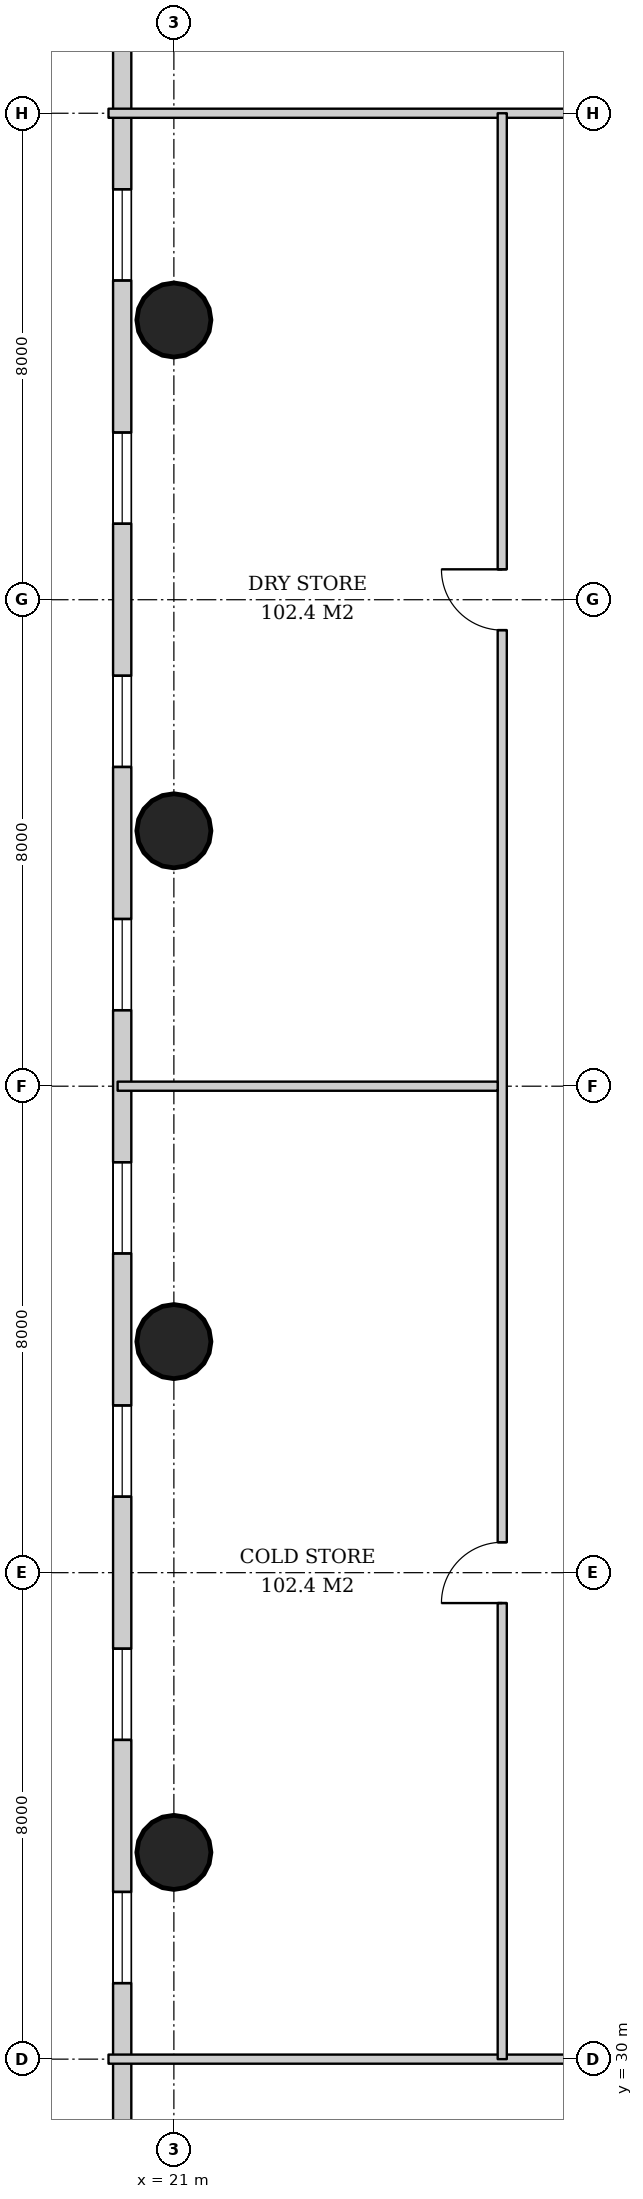
"""IFC4 building model, lengths in metres.
Left out: names, types, materials, properties, quantities, classifications, styles, units other than length and angle.
Written with IfcOpenShell. Run it as: python <this file> out.ifc"""

import sys

from ifc_helpers import new_model, si_unit, direction, frame, frame_2d, origin, origin_2d, place, context, subcontext, project, spatial, rectangle, hollow_circle, extrude, element, fill, save


model = new_model("IFC4")
c1 = context("Model", 3, precision=1e-05, world=origin(), true_north=direction((0.0, 1.0)))
c2 = subcontext(c1, "Body", "Model", "MODEL_VIEW")
j1 = project(units=[si_unit("LENGTHUNIT", "METRE"), si_unit("PLANEANGLEUNIT", "RADIAN")], contexts=[c1])
p1 = place(None, origin())
s1 = spatial("IfcSite", under=j1, at=p1, CompositionType="ELEMENT")
p2 = place(p1, origin())
s2 = spatial("IfcBuilding", under=s1, at=p2, CompositionType="ELEMENT")
p3 = place(p2, frame((0.0, 0.0, 16.0)))
s3 = spatial("IfcBuildingStorey", under=s2, at=p3, CompositionType="ELEMENT", Elevation=16.0)
for number, where, z_axis, x_axis in (
    (1, (21.0, 58.6, 0.0), (0.0, 0.0, 1.0), (1.0, 0.0, 0.0)),
    (2, (21.0, 50.2, 0.0), (0.0, 0.0, 1.0), (1.0, 0.0, 0.0)),
    (3, (21.0, 41.8, 0.0), (0.0, 0.0, 1.0), (1.0, 0.0, 0.0)),
    (4, (21.0, 33.4, 0.0), (0.0, 0.0, 1.0), (1.0, 0.0, 0.0)),
):
    element("IfcColumn", number, at=place(p3, frame(where, z_axis=z_axis, x_axis=x_axis)), inside=s3, PredefinedType="COLUMN", context=c2, shape_type="SweptSolid", body=[
        extrude(hollow_circle(Radius=0.61, WallThickness=0.04, at=origin_2d()), origin(), (0.0, 0.0, 1.0), 5.0),
    ])
p4 = place(p3, frame((20.15, 70.7, 0.0), z_axis=(0.0, 0.0, 1.0), x_axis=(0.0, -1.0, 0.0)))
e5 = element("IfcWall", 5, at=p4, inside=s3, PredefinedType="SOLIDWALL", context=c2, shape_type="SweptSolid", body=[
    extrude(rectangle(XDim=49.4, YDim=0.3, at=frame_2d((24.7, 0.0))), origin(), (0.0, 0.0, 1.0), 4.7),
])
p5 = place(p4, frame((1.2, 0.0, 0.9)))
e6 = element("IfcOpeningElement", 6, at=p5, cuts=e5, PredefinedType="OPENING", context=c2, shape_type="SweptSolid", body=[
    extrude(rectangle(XDim=1.5, YDim=3.2, at=frame_2d((0.75, 1.6))), frame((0.0, 0.16, 0.0), z_axis=(0.0, -1.0, 0.0), x_axis=(1.0, 0.0, 0.0)), (0.0, 0.0, 1.0), 0.32),
])
p6 = place(p4, frame((5.7, 0.0, 0.9)))
e7 = element("IfcOpeningElement", 7, at=p6, cuts=e5, PredefinedType="OPENING", context=c2, shape_type="SweptSolid", body=[
    extrude(rectangle(XDim=1.5, YDim=3.2, at=frame_2d((0.75, 1.6))), frame((0.0, 0.16, 0.0), z_axis=(0.0, -1.0, 0.0), x_axis=(1.0, 0.0, 0.0)), (0.0, 0.0, 1.0), 0.32),
])
p7 = place(p4, frame((9.95, 0.0, 0.9)))
e8 = element("IfcOpeningElement", 8, at=p7, cuts=e5, PredefinedType="OPENING", context=c2, shape_type="SweptSolid", body=[
    extrude(rectangle(XDim=1.5, YDim=3.2, at=frame_2d((0.75, 1.6))), frame((0.0, 0.16, 0.0), z_axis=(0.0, -1.0, 0.0), x_axis=(1.0, 0.0, 0.0)), (0.0, 0.0, 1.0), 0.32),
])
p8 = place(p4, frame((13.95, 0.0, 0.9)))
e9 = element("IfcOpeningElement", 9, at=p8, cuts=e5, PredefinedType="OPENING", context=c2, shape_type="SweptSolid", body=[
    extrude(rectangle(XDim=1.5, YDim=3.2, at=frame_2d((0.75, 1.6))), frame((0.0, 0.16, 0.0), z_axis=(0.0, -1.0, 0.0), x_axis=(1.0, 0.0, 0.0)), (0.0, 0.0, 1.0), 0.32),
])
p9 = place(p4, frame((17.95, 0.0, 0.9)))
e10 = element("IfcOpeningElement", 10, at=p9, cuts=e5, PredefinedType="OPENING", context=c2, shape_type="SweptSolid", body=[
    extrude(rectangle(XDim=1.5, YDim=3.2, at=frame_2d((0.75, 1.6))), frame((0.0, 0.16, 0.0), z_axis=(0.0, -1.0, 0.0), x_axis=(1.0, 0.0, 0.0)), (0.0, 0.0, 1.0), 0.32),
])
p10 = place(p4, frame((21.95, 0.0, 0.9)))
e11 = element("IfcOpeningElement", 11, at=p10, cuts=e5, PredefinedType="OPENING", context=c2, shape_type="SweptSolid", body=[
    extrude(rectangle(XDim=1.5, YDim=3.2, at=frame_2d((0.75, 1.6))), frame((0.0, 0.16, 0.0), z_axis=(0.0, -1.0, 0.0), x_axis=(1.0, 0.0, 0.0)), (0.0, 0.0, 1.0), 0.32),
])
p11 = place(p4, frame((25.95, 0.0, 0.9)))
e12 = element("IfcOpeningElement", 12, at=p11, cuts=e5, PredefinedType="OPENING", context=c2, shape_type="SweptSolid", body=[
    extrude(rectangle(XDim=1.5, YDim=3.2, at=frame_2d((0.75, 1.6))), frame((0.0, 0.16, 0.0), z_axis=(0.0, -1.0, 0.0), x_axis=(1.0, 0.0, 0.0)), (0.0, 0.0, 1.0), 0.32),
])
p12 = place(p4, frame((29.95, 0.0, 0.9)))
e13 = element("IfcOpeningElement", 13, at=p12, cuts=e5, PredefinedType="OPENING", context=c2, shape_type="SweptSolid", body=[
    extrude(rectangle(XDim=1.5, YDim=3.2, at=frame_2d((0.75, 1.6))), frame((0.0, 0.16, 0.0), z_axis=(0.0, -1.0, 0.0), x_axis=(1.0, 0.0, 0.0)), (0.0, 0.0, 1.0), 0.32),
])
p13 = place(p4, frame((33.95, 0.0, 0.9)))
e14 = element("IfcOpeningElement", 14, at=p13, cuts=e5, PredefinedType="OPENING", context=c2, shape_type="SweptSolid", body=[
    extrude(rectangle(XDim=1.5, YDim=3.2, at=frame_2d((0.75, 1.6))), frame((0.0, 0.16, 0.0), z_axis=(0.0, -1.0, 0.0), x_axis=(1.0, 0.0, 0.0)), (0.0, 0.0, 1.0), 0.32),
])
p14 = place(p4, frame((37.95, 0.0, 0.9)))
e15 = element("IfcOpeningElement", 15, at=p14, cuts=e5, PredefinedType="OPENING", context=c2, shape_type="SweptSolid", body=[
    extrude(rectangle(XDim=1.5, YDim=3.2, at=frame_2d((0.75, 1.6))), frame((0.0, 0.16, 0.0), z_axis=(0.0, -1.0, 0.0), x_axis=(1.0, 0.0, 0.0)), (0.0, 0.0, 1.0), 0.32),
])
p15 = place(p4, frame((42.2, 0.0, 0.9)))
e16 = element("IfcOpeningElement", 16, at=p15, cuts=e5, PredefinedType="OPENING", context=c2, shape_type="SweptSolid", body=[
    extrude(rectangle(XDim=1.5, YDim=3.2, at=frame_2d((0.75, 1.6))), frame((0.0, 0.16, 0.0), z_axis=(0.0, -1.0, 0.0), x_axis=(1.0, 0.0, 0.0)), (0.0, 0.0, 1.0), 0.32),
])
p16 = place(p4, frame((46.7, 0.0, 0.9)))
e17 = element("IfcOpeningElement", 17, at=p16, cuts=e5, PredefinedType="OPENING", context=c2, shape_type="SweptSolid", body=[
    extrude(rectangle(XDim=1.5, YDim=3.2, at=frame_2d((0.75, 1.6))), frame((0.0, 0.16, 0.0), z_axis=(0.0, -1.0, 0.0), x_axis=(1.0, 0.0, 0.0)), (0.0, 0.0, 1.0), 0.32),
])
p17 = place(p3, frame((19.925, 30.0, 0.0), z_axis=(0.0, 0.0, 1.0), x_axis=(1.0, 0.0, 0.0)))
e18 = element("IfcWall", 18, at=p17, inside=s3, PredefinedType="PARTITIONING", context=c2, shape_type="SweptSolid", body=[
    extrude(rectangle(XDim=50.15, YDim=0.15, at=frame_2d((25.075, 0.0))), origin(), (0.0, 0.0, 1.0), 3.688),
])
p18 = place(p17, frame((7.625, 0.0, 0.0)))
e19 = element("IfcOpeningElement", 19, at=p18, cuts=e18, PredefinedType="OPENING", context=c2, shape_type="SweptSolid", body=[
    extrude(rectangle(XDim=1.5, YDim=2.1, at=frame_2d((0.75, 1.05))), frame((0.0, 0.085, 0.0), z_axis=(0.0, -1.0, 0.0), x_axis=(1.0, 0.0, 0.0)), (0.0, 0.0, 1.0), 0.17),
])
p19 = place(p17, frame((20.375, 0.0, 0.0)))
e20 = element("IfcOpeningElement", 20, at=p19, cuts=e18, PredefinedType="OPENING", context=c2, shape_type="SweptSolid", body=[
    extrude(rectangle(XDim=1.0, YDim=2.1, at=frame_2d((0.5, 1.05))), frame((0.0, 0.085, 0.0), z_axis=(0.0, -1.0, 0.0), x_axis=(1.0, 0.0, 0.0)), (0.0, 0.0, 1.0), 0.17),
])
p20 = place(p17, frame((28.775, 0.0, 0.0)))
e21 = element("IfcOpeningElement", 21, at=p20, cuts=e18, PredefinedType="OPENING", context=c2, shape_type="SweptSolid", body=[
    extrude(rectangle(XDim=1.0, YDim=2.1, at=frame_2d((0.5, 1.05))), frame((0.0, 0.085, 0.0), z_axis=(0.0, -1.0, 0.0), x_axis=(1.0, 0.0, 0.0)), (0.0, 0.0, 1.0), 0.17),
])
p21 = place(p17, frame((39.875, 0.0, 0.0)))
e22 = element("IfcOpeningElement", 22, at=p21, cuts=e18, PredefinedType="OPENING", context=c2, shape_type="SweptSolid", body=[
    extrude(rectangle(XDim=1.0, YDim=2.1, at=frame_2d((0.5, 1.05))), frame((0.0, 0.085, 0.0), z_axis=(0.0, -1.0, 0.0), x_axis=(1.0, 0.0, 0.0)), (0.0, 0.0, 1.0), 0.17),
])
p22 = place(p3, frame((19.925, 62.0, 0.0), z_axis=(0.0, 0.0, 1.0), x_axis=(1.0, 0.0, 0.0)))
e23 = element("IfcWall", 23, at=p22, inside=s3, PredefinedType="PARTITIONING", context=c2, shape_type="SweptSolid", body=[
    extrude(rectangle(XDim=50.15, YDim=0.15, at=frame_2d((25.075, 0.0))), origin(), (0.0, 0.0, 1.0), 3.688),
])
p23 = place(p22, frame((15.875, 0.0, 0.0)))
e24 = element("IfcOpeningElement", 24, at=p23, cuts=e23, PredefinedType="OPENING", context=c2, shape_type="SweptSolid", body=[
    extrude(rectangle(XDim=1.8, YDim=2.4, at=frame_2d((0.9, 1.2))), frame((0.0, 0.085, 0.0), z_axis=(0.0, -1.0, 0.0), x_axis=(1.0, 0.0, 0.0)), (0.0, 0.0, 1.0), 0.17),
])
p24 = place(p22, frame((39.875, 0.0, 0.0)))
e25 = element("IfcOpeningElement", 25, at=p24, cuts=e23, PredefinedType="OPENING", context=c2, shape_type="SweptSolid", body=[
    extrude(rectangle(XDim=1.0, YDim=2.1, at=frame_2d((0.5, 1.05))), frame((0.0, 0.085, 0.0), z_axis=(0.0, -1.0, 0.0), x_axis=(1.0, 0.0, 0.0)), (0.0, 0.0, 1.0), 0.17),
])
p25 = place(p3, frame((26.4, 30.0, 0.0), z_axis=(0.0, 0.0, 1.0), x_axis=(0.0, 1.0, 0.0)))
e26 = element("IfcWall", 26, at=p25, inside=s3, PredefinedType="PARTITIONING", context=c2, shape_type="SweptSolid", body=[
    extrude(rectangle(XDim=32.0, YDim=0.15, at=frame_2d((16.0, 0.0))), origin(), (0.0, 0.0, 1.0), 3.688),
])
p26 = place(p25, frame((7.5, 0.0, 0.0)))
e27 = element("IfcOpeningElement", 27, at=p26, cuts=e26, PredefinedType="OPENING", context=c2, shape_type="SweptSolid", body=[
    extrude(rectangle(XDim=1.0, YDim=2.1, at=frame_2d((0.5, 1.05))), frame((0.0, 0.085, 0.0), z_axis=(0.0, -1.0, 0.0), x_axis=(1.0, 0.0, 0.0)), (0.0, 0.0, 1.0), 0.17),
])
p27 = place(p25, frame((23.5, 0.0, 0.0)))
e28 = element("IfcOpeningElement", 28, at=p27, cuts=e26, PredefinedType="OPENING", context=c2, shape_type="SweptSolid", body=[
    extrude(rectangle(XDim=1.0, YDim=2.1, at=frame_2d((0.5, 1.05))), frame((0.0, 0.085, 0.0), z_axis=(0.0, -1.0, 0.0), x_axis=(1.0, 0.0, 0.0)), (0.0, 0.0, 1.0), 0.17),
])
p28 = place(p3, frame((20.075, 46.0, 0.0), z_axis=(0.0, 0.0, 1.0), x_axis=(1.0, 0.0, 0.0)))
e29 = element("IfcWall", 29, at=p28, inside=s3, PredefinedType="PARTITIONING", context=c2, shape_type="SweptSolid", body=[
    extrude(rectangle(XDim=6.25, YDim=0.15, at=frame_2d((3.125, 0.0))), origin(), (0.0, 0.0, 1.0), 4.1),
])
p29 = place(p7, origin())
e30 = element("IfcWindow", 30, at=p29, inside=s3, PartitioningType="SINGLE_PANEL", PredefinedType="WINDOW", context=c2, shape_type="SweptSolid", body=[
    extrude(rectangle(XDim=1.5, YDim=3.2, at=frame_2d((0.75, 1.6))), frame((0.0, 0.03, 0.0), z_axis=(0.0, -1.0, 0.0), x_axis=(1.0, 0.0, 0.0)), (0.0, 0.0, 1.0), 0.06),
])
fill(e8, e30)
p30 = place(p8, origin())
e31 = element("IfcWindow", 31, at=p30, inside=s3, PartitioningType="SINGLE_PANEL", PredefinedType="WINDOW", context=c2, shape_type="SweptSolid", body=[
    extrude(rectangle(XDim=1.5, YDim=3.2, at=frame_2d((0.75, 1.6))), frame((0.0, 0.03, 0.0), z_axis=(0.0, -1.0, 0.0), x_axis=(1.0, 0.0, 0.0)), (0.0, 0.0, 1.0), 0.06),
])
fill(e9, e31)
p31 = place(p9, origin())
e32 = element("IfcWindow", 32, at=p31, inside=s3, PartitioningType="SINGLE_PANEL", PredefinedType="WINDOW", context=c2, shape_type="SweptSolid", body=[
    extrude(rectangle(XDim=1.5, YDim=3.2, at=frame_2d((0.75, 1.6))), frame((0.0, 0.03, 0.0), z_axis=(0.0, -1.0, 0.0), x_axis=(1.0, 0.0, 0.0)), (0.0, 0.0, 1.0), 0.06),
])
fill(e10, e32)
p32 = place(p10, origin())
e33 = element("IfcWindow", 33, at=p32, inside=s3, PartitioningType="SINGLE_PANEL", PredefinedType="WINDOW", context=c2, shape_type="SweptSolid", body=[
    extrude(rectangle(XDim=1.5, YDim=3.2, at=frame_2d((0.75, 1.6))), frame((0.0, 0.03, 0.0), z_axis=(0.0, -1.0, 0.0), x_axis=(1.0, 0.0, 0.0)), (0.0, 0.0, 1.0), 0.06),
])
fill(e11, e33)
p33 = place(p11, origin())
e34 = element("IfcWindow", 34, at=p33, inside=s3, PartitioningType="SINGLE_PANEL", PredefinedType="WINDOW", context=c2, shape_type="SweptSolid", body=[
    extrude(rectangle(XDim=1.5, YDim=3.2, at=frame_2d((0.75, 1.6))), frame((0.0, 0.03, 0.0), z_axis=(0.0, -1.0, 0.0), x_axis=(1.0, 0.0, 0.0)), (0.0, 0.0, 1.0), 0.06),
])
fill(e12, e34)
p34 = place(p12, origin())
e35 = element("IfcWindow", 35, at=p34, inside=s3, PartitioningType="SINGLE_PANEL", PredefinedType="WINDOW", context=c2, shape_type="SweptSolid", body=[
    extrude(rectangle(XDim=1.5, YDim=3.2, at=frame_2d((0.75, 1.6))), frame((0.0, 0.03, 0.0), z_axis=(0.0, -1.0, 0.0), x_axis=(1.0, 0.0, 0.0)), (0.0, 0.0, 1.0), 0.06),
])
fill(e13, e35)
p35 = place(p13, origin())
e36 = element("IfcWindow", 36, at=p35, inside=s3, PartitioningType="SINGLE_PANEL", PredefinedType="WINDOW", context=c2, shape_type="SweptSolid", body=[
    extrude(rectangle(XDim=1.5, YDim=3.2, at=frame_2d((0.75, 1.6))), frame((0.0, 0.03, 0.0), z_axis=(0.0, -1.0, 0.0), x_axis=(1.0, 0.0, 0.0)), (0.0, 0.0, 1.0), 0.06),
])
fill(e14, e36)
p36 = place(p14, origin())
e37 = element("IfcWindow", 37, at=p36, inside=s3, PartitioningType="SINGLE_PANEL", PredefinedType="WINDOW", context=c2, shape_type="SweptSolid", body=[
    extrude(rectangle(XDim=1.5, YDim=3.2, at=frame_2d((0.75, 1.6))), frame((0.0, 0.03, 0.0), z_axis=(0.0, -1.0, 0.0), x_axis=(1.0, 0.0, 0.0)), (0.0, 0.0, 1.0), 0.06),
])
fill(e15, e37)
p37 = place(p26, origin())
e38 = element("IfcDoor", 38, at=p37, inside=s3, OperationType="SINGLE_SWING_LEFT", PredefinedType="DOOR", context=c2, shape_type="SweptSolid", body=[
    extrude(rectangle(XDim=1.0, YDim=2.1, at=frame_2d((0.5, 1.05))), frame((0.0, 0.025, 0.0), z_axis=(0.0, -1.0, 0.0), x_axis=(1.0, 0.0, 0.0)), (0.0, 0.0, 1.0), 0.05),
])
fill(e27, e38)
p38 = place(p27, origin())
e39 = element("IfcDoor", 39, at=p38, inside=s3, OperationType="SINGLE_SWING_RIGHT", PredefinedType="DOOR", context=c2, shape_type="SweptSolid", body=[
    extrude(rectangle(XDim=1.0, YDim=2.1, at=frame_2d((0.5, 1.05))), frame((0.0, 0.025, 0.0), z_axis=(0.0, -1.0, 0.0), x_axis=(1.0, 0.0, 0.0)), (0.0, 0.0, 1.0), 0.05),
])
fill(e28, e39)
save(model, sys.argv[1])
